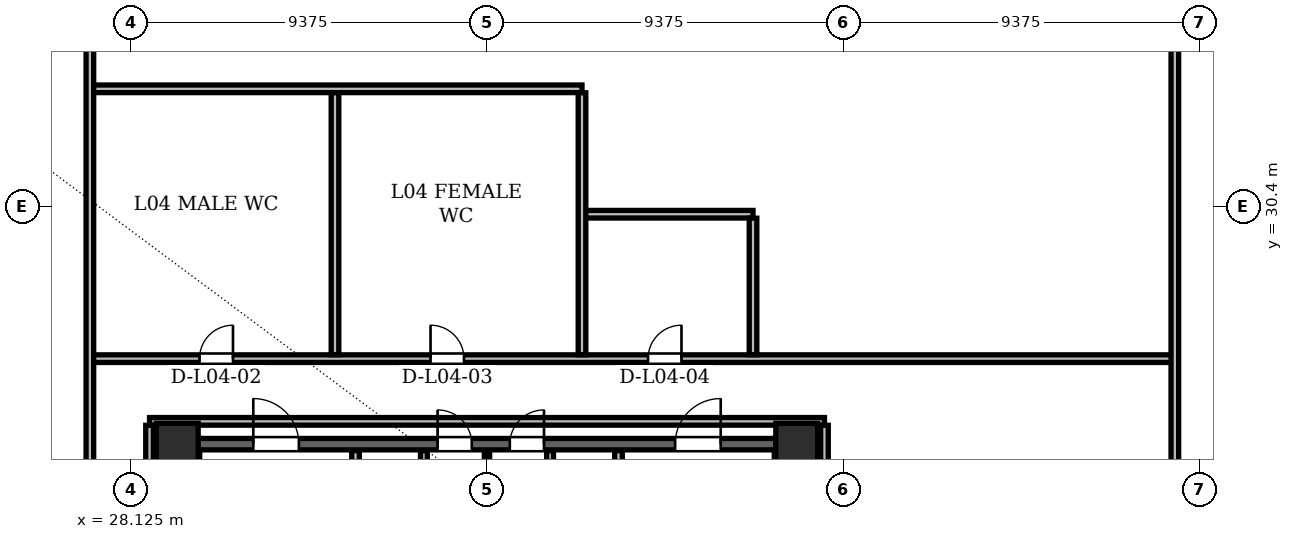
"""IFC4 building model, lengths in metres.
Left out: names, types, materials, properties, quantities, classifications, styles, units other than length and angle.
Written with IfcOpenShell. Run it as: python <this file> out.ifc"""

import sys

from ifc_helpers import new_model, si_unit, direction, frame, frame_2d, origin, origin_2d, place, context, subcontext, project, spatial, rectangle, hollow_rectangle, extrude, element, fill, save


model = new_model("IFC4")
c1 = context("Model", 3, precision=1e-05, world=origin(), true_north=direction((0.0, 1.0)))
c2 = subcontext(c1, "Body", "Model", "MODEL_VIEW")
j1 = project(units=[si_unit("LENGTHUNIT", "METRE"), si_unit("PLANEANGLEUNIT", "RADIAN")], contexts=[c1])
p1 = place(None, origin())
s1 = spatial("IfcSite", under=j1, at=p1, CompositionType="ELEMENT")
p2 = place(p1, origin())
s2 = spatial("IfcBuilding", under=s1, at=p2, CompositionType="ELEMENT")
p3 = place(p2, frame((0.0, 0.0, 18.3)))
s3 = spatial("IfcBuildingStorey", under=s2, at=p3, CompositionType="ELEMENT", Elevation=18.3)
for number, where, z_axis, x_axis in (
    (1, (45.65, 24.15, 0.0), (0.0, 0.0, 1.0), (1.0, 0.0, 0.0)),
    (2, (29.35, 24.15, 0.0), (0.0, 0.0, 1.0), (1.0, 0.0, 0.0)),
):
    element("IfcColumn", number, at=place(p3, frame(where, z_axis=z_axis, x_axis=x_axis)), inside=s3, PredefinedType="COLUMN", context=c2, shape_type="SweptSolid", body=[
        extrude(hollow_rectangle(XDim=1.1, YDim=1.1, WallThickness=0.09, at=origin_2d()), origin(), (0.0, 0.0, 1.0), 4.2),
    ])
for number, where, z_axis, x_axis in (
    (3, (29.64, 11.0, 0.0), (0.0, 0.0, 1.0), (0.0, 1.0, 0.0)),
    (4, (45.36, 11.0, 0.0), (0.0, 0.0, 1.0), (0.0, 1.0, 0.0)),
):
    element("IfcWall", number, at=place(p3, frame(where, z_axis=z_axis, x_axis=x_axis)), inside=s3, PredefinedType="SHEAR", context=c2, shape_type="SweptSolid", body=[
        extrude(rectangle(XDim=13.3, YDim=0.6, at=frame_2d((6.65, 0.0))), origin(), (0.0, 0.0, 1.0), 3.88),
    ])
p4 = place(p3, frame((29.65, 24.15, 0.0), z_axis=(0.0, 0.0, 1.0), x_axis=(1.0, 0.0, 0.0)))
e5 = element("IfcWall", 5, at=p4, inside=s3, PredefinedType="SHEAR", context=c2, shape_type="SweptSolid", body=[
    extrude(rectangle(XDim=15.7, YDim=0.3, at=frame_2d((7.85, 0.0))), origin(), (0.0, 0.0, 1.0), 3.88),
])
p5 = place(p4, frame((1.7, 0.0, 0.0)))
e6 = element("IfcOpeningElement", 6, at=p5, cuts=e5, PredefinedType="OPENING", context=c2, shape_type="SweptSolid", body=[
    extrude(rectangle(XDim=1.2, YDim=2.2, at=frame_2d((0.6, 1.1))), frame((0.0, 0.15, 0.0), z_axis=(0.0, -1.0, 0.0), x_axis=(1.0, 0.0, 0.0)), (0.0, 0.0, 1.0), 0.3),
])
p6 = place(p4, frame((12.8, 0.0, 0.0)))
e7 = element("IfcOpeningElement", 7, at=p6, cuts=e5, PredefinedType="OPENING", context=c2, shape_type="SweptSolid", body=[
    extrude(rectangle(XDim=1.2, YDim=2.2, at=frame_2d((0.6, 1.1))), frame((0.0, 0.15, 0.0), z_axis=(0.0, -1.0, 0.0), x_axis=(1.0, 0.0, 0.0)), (0.0, 0.0, 1.0), 0.3),
])
p7 = place(p4, frame((6.55, 0.0, 0.0)))
e8 = element("IfcOpeningElement", 8, at=p7, cuts=e5, PredefinedType="OPENING", context=c2, shape_type="SweptSolid", body=[
    extrude(rectangle(XDim=0.9, YDim=2.05, at=frame_2d((0.45, 1.025))), frame((0.0, 0.15, 0.0), z_axis=(0.0, -1.0, 0.0), x_axis=(1.0, 0.0, 0.0)), (0.0, 0.0, 1.0), 0.3),
])
p8 = place(p4, frame((8.45, 0.0, 0.0)))
e9 = element("IfcOpeningElement", 9, at=p8, cuts=e5, PredefinedType="OPENING", context=c2, shape_type="SweptSolid", body=[
    extrude(rectangle(XDim=0.9, YDim=2.05, at=frame_2d((0.45, 1.025))), frame((0.0, 0.15, 0.0), z_axis=(0.0, -1.0, 0.0), x_axis=(1.0, 0.0, 0.0)), (0.0, 0.0, 1.0), 0.3),
])
p9 = place(p3, frame((34.04, 19.48, 0.0), z_axis=(0.0, 0.0, 1.0), x_axis=(0.0, 1.0, 0.0)))
e10 = element("IfcWall", 10, at=p9, inside=s3, PredefinedType="PARTITIONING", context=c2, shape_type="SweptSolid", body=[
    extrude(rectangle(XDim=4.5, YDim=0.2, at=frame_2d((2.25, 0.0))), origin(), (0.0, 0.0, 1.0), 2.92),
])
p10 = place(p9, frame((2.12, 0.0, 0.0)))
e11 = element("IfcOpeningElement", 11, at=p10, cuts=e10, PredefinedType="OPENING", context=c2, shape_type="SweptSolid", body=[
    extrude(rectangle(XDim=1.1, YDim=2.2, at=frame_2d((0.55, 1.1))), frame((0.0, 0.1, 0.0), z_axis=(0.0, -1.0, 0.0), x_axis=(1.0, 0.0, 0.0)), (0.0, 0.0, 1.0), 0.2),
])
p11 = place(p3, frame((35.84, 20.96, 0.0), z_axis=(0.0, 0.0, 1.0), x_axis=(0.0, 1.0, 0.0)))
e12 = element("IfcWall", 12, at=p11, inside=s3, PredefinedType="PARTITIONING", context=c2, shape_type="SweptSolid", body=[
    extrude(rectangle(XDim=3.02, YDim=0.18, at=frame_2d((1.51, 0.0))), origin(), (0.0, 0.0, 1.0), 2.92),
])
p12 = place(p3, frame((40.96, 19.48, 0.0), z_axis=(0.0, 0.0, 1.0), x_axis=(0.0, 1.0, 0.0)))
e13 = element("IfcWall", 13, at=p12, inside=s3, PredefinedType="PARTITIONING", context=c2, shape_type="SweptSolid", body=[
    extrude(rectangle(XDim=4.5, YDim=0.2, at=frame_2d((2.25, 0.0))), origin(), (0.0, 0.0, 1.0), 2.92),
])
p13 = place(p12, frame((2.12, 0.0, 0.0)))
e14 = element("IfcOpeningElement", 14, at=p13, cuts=e13, PredefinedType="OPENING", context=c2, shape_type="SweptSolid", body=[
    extrude(rectangle(XDim=1.1, YDim=2.2, at=frame_2d((0.55, 1.1))), frame((0.0, 0.1, 0.0), z_axis=(0.0, -1.0, 0.0), x_axis=(1.0, 0.0, 0.0)), (0.0, 0.0, 1.0), 0.2),
])
p14 = place(p3, frame((39.16, 20.96, 0.0), z_axis=(0.0, 0.0, 1.0), x_axis=(0.0, 1.0, 0.0)))
e15 = element("IfcWall", 15, at=p14, inside=s3, PredefinedType="PARTITIONING", context=c2, shape_type="SweptSolid", body=[
    extrude(rectangle(XDim=3.02, YDim=0.18, at=frame_2d((1.51, 0.0))), origin(), (0.0, 0.0, 1.0), 2.92),
])
p15 = place(p3, frame((37.5, 21.06, 0.0), z_axis=(0.0, 0.0, 1.0), x_axis=(0.0, 1.0, 0.0)))
e16 = element("IfcWall", 16, at=p15, inside=s3, PredefinedType="PARTITIONING", context=c2, shape_type="SweptSolid", body=[
    extrude(rectangle(XDim=2.92, YDim=0.14, at=frame_2d((1.46, 0.0))), origin(), (0.0, 0.0, 1.0), 2.92),
])
p16 = place(p3, frame((28.62, 24.75, 0.0), z_axis=(0.0, 0.0, 1.0), x_axis=(1.0, 0.0, 0.0)))
e17 = element("IfcWall", 17, at=p16, inside=s3, PredefinedType="PARTITIONING", context=c2, shape_type="SweptSolid", body=[
    extrude(rectangle(XDim=17.76, YDim=0.2, at=frame_2d((8.88, 0.0))), origin(), (0.0, 0.0, 1.0), 2.943),
])
p17 = place(p3, frame((27.05, 26.4, 0.0), z_axis=(0.0, 0.0, 1.0), x_axis=(1.0, 0.0, 0.0)))
e18 = element("IfcWall", 18, at=p17, inside=s3, PredefinedType="PARTITIONING", context=c2, shape_type="SweptSolid", body=[
    extrude(rectangle(XDim=28.55, YDim=0.2, at=frame_2d((14.275, 0.0))), origin(), (0.0, 0.0, 1.0), 2.943),
])
p18 = place(p17, frame((2.885, 0.0, 0.0)))
e19 = element("IfcOpeningElement", 19, at=p18, cuts=e18, PredefinedType="OPENING", context=c2, shape_type="SweptSolid", body=[
    extrude(rectangle(XDim=0.88, YDim=2.08, at=frame_2d((0.44, 1.04))), frame((0.0, 0.1, 0.0), z_axis=(0.0, -1.0, 0.0), x_axis=(1.0, 0.0, 0.0)), (0.0, 0.0, 1.0), 0.2),
])
p19 = place(p17, frame((8.964, 0.0, 0.0)))
e20 = element("IfcOpeningElement", 20, at=p19, cuts=e18, PredefinedType="OPENING", context=c2, shape_type="SweptSolid", body=[
    extrude(rectangle(XDim=0.88, YDim=2.08, at=frame_2d((0.44, 1.04))), frame((0.0, 0.1, 0.0), z_axis=(0.0, -1.0, 0.0), x_axis=(1.0, 0.0, 0.0)), (0.0, 0.0, 1.0), 0.2),
])
p20 = place(p17, frame((14.688, 0.0, 0.0)))
e21 = element("IfcOpeningElement", 21, at=p20, cuts=e18, PredefinedType="OPENING", context=c2, shape_type="SweptSolid", body=[
    extrude(rectangle(XDim=0.88, YDim=2.08, at=frame_2d((0.44, 1.04))), frame((0.0, 0.1, 0.0), z_axis=(0.0, -1.0, 0.0), x_axis=(1.0, 0.0, 0.0)), (0.0, 0.0, 1.0), 0.2),
])
p21 = place(p3, frame((40.0, 30.2, 0.0), z_axis=(0.0, 0.0, 1.0), x_axis=(1.0, 0.0, 0.0)))
e22 = element("IfcWall", 22, at=p21, inside=s3, PredefinedType="PARTITIONING", context=c2, shape_type="SweptSolid", body=[
    extrude(rectangle(XDim=4.5, YDim=0.2, at=frame_2d((2.25, 0.0))), origin(), (0.0, 0.0, 1.0), 3.88),
])
p22 = place(p3, frame((27.05, 33.5, 0.0), z_axis=(0.0, 0.0, 1.0), x_axis=(1.0, 0.0, 0.0)))
e23 = element("IfcWall", 23, at=p22, inside=s3, PredefinedType="PARTITIONING", context=c2, shape_type="SweptSolid", body=[
    extrude(rectangle(XDim=12.95, YDim=0.2, at=frame_2d((6.475, 0.0))), origin(), (0.0, 0.0, 1.0), 2.943),
])
p23 = place(p3, frame((27.05, 10.504, 0.0), z_axis=(0.0, 0.0, 1.0), x_axis=(0.0, 1.0, 0.0)))
e24 = element("IfcWall", 24, at=p23, inside=s3, PredefinedType="PARTITIONING", context=c2, shape_type="SweptSolid", body=[
    extrude(rectangle(XDim=28.376, YDim=0.2, at=frame_2d((14.188, 0.0))), origin(), (0.0, 0.0, 1.0), 2.943),
])
p24 = place(p23, frame((5.975, 0.0, 0.0)))
e25 = element("IfcOpeningElement", 25, at=p24, cuts=e24, PredefinedType="OPENING", context=c2, shape_type="SweptSolid", body=[
    extrude(rectangle(XDim=1.3, YDim=2.2, at=frame_2d((0.65, 1.1))), frame((0.0, 0.1, 0.0), z_axis=(0.0, -1.0, 0.0), x_axis=(1.0, 0.0, 0.0)), (0.0, 0.0, 1.0), 0.2),
])
p25 = place(p3, frame((28.62, 10.504, 0.0), z_axis=(0.0, 0.0, 1.0), x_axis=(0.0, 1.0, 0.0)))
e26 = element("IfcWall", 26, at=p25, inside=s3, PredefinedType="PARTITIONING", context=c2, shape_type="SweptSolid", body=[
    extrude(rectangle(XDim=14.142, YDim=0.2, at=frame_2d((7.071, 0.0))), origin(), (0.0, 0.0, 1.0), 2.943),
])
for number, where, z_axis, x_axis in (
    (27, (33.5, 26.504, 0.0), (0.0, 0.0, 1.0), (0.0, 1.0, 0.0)),
    (28, (40.0, 26.504, 0.0), (0.0, 0.0, 1.0), (0.0, 1.0, 0.0)),
):
    element("IfcWall", number, at=place(p3, frame(where, z_axis=z_axis, x_axis=x_axis)), inside=s3, PredefinedType="PARTITIONING", context=c2, shape_type="SweptSolid", body=[
        extrude(rectangle(XDim=6.892, YDim=0.2, at=frame_2d((3.446, 0.0))), origin(), (0.0, 0.0, 1.0), 3.88),
    ])
p26 = place(p3, frame((44.5, 26.504, 0.0), z_axis=(0.0, 0.0, 1.0), x_axis=(0.0, 1.0, 0.0)))
e29 = element("IfcWall", 29, at=p26, inside=s3, PredefinedType="PARTITIONING", context=c2, shape_type="SweptSolid", body=[
    extrude(rectangle(XDim=3.592, YDim=0.2, at=frame_2d((1.796, 0.0))), origin(), (0.0, 0.0, 1.0), 3.88),
])
p27 = place(p3, frame((46.38, 10.504, 0.0), z_axis=(0.0, 0.0, 1.0), x_axis=(0.0, 1.0, 0.0)))
e30 = element("IfcWall", 30, at=p27, inside=s3, PredefinedType="PARTITIONING", context=c2, shape_type="SweptSolid", body=[
    extrude(rectangle(XDim=14.142, YDim=0.2, at=frame_2d((7.071, 0.0))), origin(), (0.0, 0.0, 1.0), 3.88),
])
p28 = place(p3, frame((55.6, 2.044, 0.0), z_axis=(0.0, 0.0, 1.0), x_axis=(0.0, 1.0, 0.0)))
e31 = element("IfcWall", 31, at=p28, inside=s3, PredefinedType="PARTITIONING", context=c2, shape_type="SweptSolid", body=[
    extrude(rectangle(XDim=41.512, YDim=0.2, at=frame_2d((20.756, 0.0))), origin(), (0.0, 0.0, 1.0), 2.67),
])
p29 = place(p28, frame((14.435, 0.0, 0.0)))
e32 = element("IfcOpeningElement", 32, at=p29, cuts=e31, PredefinedType="OPENING", context=c2, shape_type="SweptSolid", body=[
    extrude(rectangle(XDim=1.3, YDim=2.2, at=frame_2d((0.65, 1.1))), frame((0.0, 0.1, 0.0), z_axis=(0.0, -1.0, 0.0), x_axis=(1.0, 0.0, 0.0)), (0.0, 0.0, 1.0), 0.2),
])
p30 = place(p5, origin())
e33 = element("IfcDoor", 33, at=p30, inside=s3, OperationType="SINGLE_SWING_LEFT", PredefinedType="DOOR", context=c2, shape_type="SweptSolid", body=[
    extrude(rectangle(XDim=1.2, YDim=2.2, at=frame_2d((0.6, 1.1))), frame((0.0, 0.025, 0.0), z_axis=(0.0, -1.0, 0.0), x_axis=(1.0, 0.0, 0.0)), (0.0, 0.0, 1.0), 0.05),
])
fill(e6, e33)
p31 = place(p6, origin())
e34 = element("IfcDoor", 34, at=p31, inside=s3, OperationType="SINGLE_SWING_RIGHT", PredefinedType="DOOR", context=c2, shape_type="SweptSolid", body=[
    extrude(rectangle(XDim=1.2, YDim=2.2, at=frame_2d((0.6, 1.1))), frame((0.0, 0.025, 0.0), z_axis=(0.0, -1.0, 0.0), x_axis=(1.0, 0.0, 0.0)), (0.0, 0.0, 1.0), 0.05),
])
fill(e7, e34)
p32 = place(p7, origin())
e35 = element("IfcDoor", 35, at=p32, inside=s3, OperationType="SINGLE_SWING_LEFT", PredefinedType="DOOR", context=c2, shape_type="SweptSolid", body=[
    extrude(rectangle(XDim=0.9, YDim=2.05, at=frame_2d((0.45, 1.025))), frame((0.0, 0.025, 0.0), z_axis=(0.0, -1.0, 0.0), x_axis=(1.0, 0.0, 0.0)), (0.0, 0.0, 1.0), 0.05),
])
fill(e8, e35)
p33 = place(p8, origin())
e36 = element("IfcDoor", 36, at=p33, inside=s3, OperationType="SINGLE_SWING_RIGHT", PredefinedType="DOOR", context=c2, shape_type="SweptSolid", body=[
    extrude(rectangle(XDim=0.9, YDim=2.05, at=frame_2d((0.45, 1.025))), frame((0.0, 0.025, 0.0), z_axis=(0.0, -1.0, 0.0), x_axis=(1.0, 0.0, 0.0)), (0.0, 0.0, 1.0), 0.05),
])
fill(e9, e36)
p34 = place(p18, origin())
e37 = element("IfcDoor", 37, at=p34, inside=s3, OperationType="SINGLE_SWING_RIGHT", PredefinedType="DOOR", context=c2, shape_type="SweptSolid", body=[
    extrude(rectangle(XDim=0.88, YDim=2.08, at=frame_2d((0.44, 1.04))), frame((0.0, 0.025, 0.0), z_axis=(0.0, -1.0, 0.0), x_axis=(1.0, 0.0, 0.0)), (0.0, 0.0, 1.0), 0.05),
])
fill(e19, e37)
p35 = place(p19, origin())
e38 = element("IfcDoor", 38, at=p35, inside=s3, OperationType="SINGLE_SWING_LEFT", PredefinedType="DOOR", context=c2, shape_type="SweptSolid", body=[
    extrude(rectangle(XDim=0.88, YDim=2.08, at=frame_2d((0.44, 1.04))), frame((0.0, 0.025, 0.0), z_axis=(0.0, -1.0, 0.0), x_axis=(1.0, 0.0, 0.0)), (0.0, 0.0, 1.0), 0.05),
])
fill(e20, e38)
p36 = place(p20, origin())
e39 = element("IfcDoor", 39, at=p36, inside=s3, OperationType="SINGLE_SWING_RIGHT", PredefinedType="DOOR", context=c2, shape_type="SweptSolid", body=[
    extrude(rectangle(XDim=0.88, YDim=2.08, at=frame_2d((0.44, 1.04))), frame((0.0, 0.025, 0.0), z_axis=(0.0, -1.0, 0.0), x_axis=(1.0, 0.0, 0.0)), (0.0, 0.0, 1.0), 0.05),
])
fill(e21, e39)
save(model, sys.argv[1])
